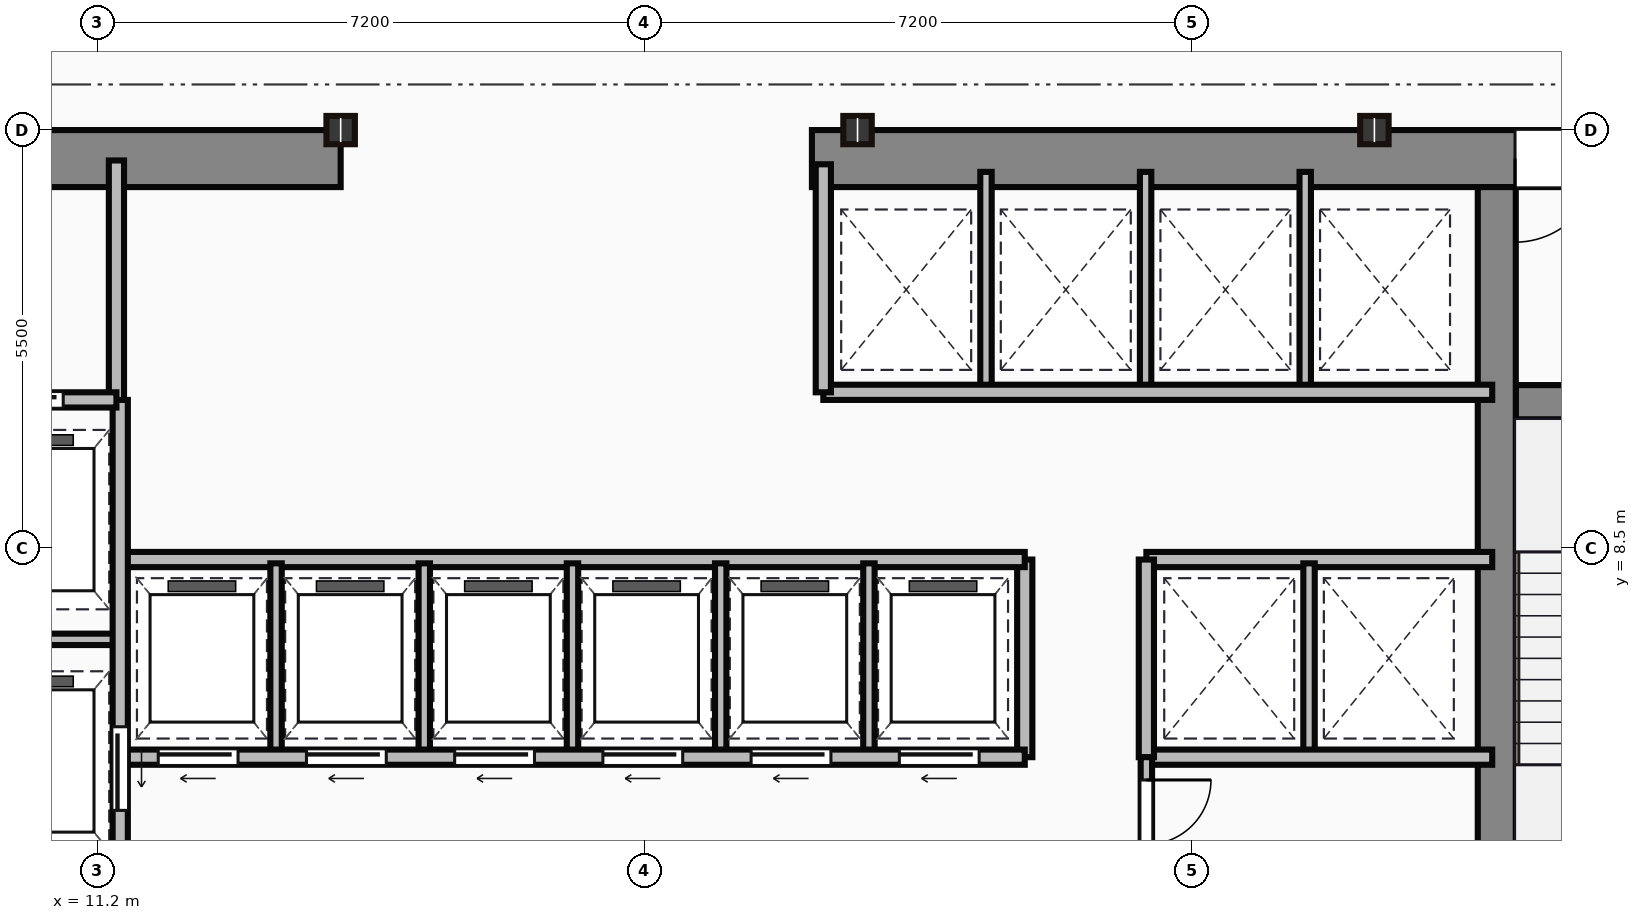
"""IFC4 building model, lengths in metres.
Left out: names, types, materials, properties, quantities, classifications, styles, units other than length and angle.
Written with IfcOpenShell. Run it as: python <this file> out.ifc"""

import sys

from ifc_helpers import new_model, si_unit, direction, frame, frame_2d, origin, origin_2d, place, context, subcontext, project, spatial, rectangle, i_section, extrude, source, transform, mapped, element, fill, save


model = new_model("IFC4")
c1 = context("Model", 3, precision=1e-05, world=origin(), true_north=direction((0.0, 1.0)))
c2 = subcontext(c1, "Body", "Model", "MODEL_VIEW")
j1 = project(units=[si_unit("LENGTHUNIT", "METRE"), si_unit("PLANEANGLEUNIT", "RADIAN")], contexts=[c1])
p1 = place(None, origin())
s1 = spatial("IfcSite", under=j1, at=p1, CompositionType="ELEMENT")
p2 = place(p1, origin())
s2 = spatial("IfcBuilding", under=s1, at=p2, CompositionType="ELEMENT")
p3 = place(p2, frame((0.0, 0.0, 155.2)))
s3 = spatial("IfcBuildingStorey", under=s2, at=p3, CompositionType="ELEMENT", Elevation=155.2)
m1 = source(origin(), c2, "Body", "SweptSolid", [
    extrude(rectangle(XDim=9.1, YDim=0.75, at=frame_2d((4.55, 0.0))), origin(), (0.0, 0.0, 1.0), 3.65),
])
p4 = place(p3, frame((5.3, 13.625, 0.0), z_axis=(0.0, 0.0, 1.0), x_axis=(1.0, 0.0, 0.0)))
e1 = element("IfcWall", 1, at=p4, inside=s3, PredefinedType="SHEAR", context=c2, shape_type="MappedRepresentation", body=[
    mapped(m1, transform((0.0, 0.0, 0.0))),
])
p5 = place(p4, frame((4.1, 0.0, 0.0)))
e2 = element("IfcOpeningElement", 2, at=p5, cuts=e1, PredefinedType="OPENING", context=c2, shape_type="SweptSolid", body=[
    extrude(rectangle(XDim=1.1, YDim=2.15, at=frame_2d((0.55, 1.075))), frame((0.0, 0.385, 0.0), z_axis=(0.0, -1.0, 0.0), x_axis=(1.0, 0.0, 0.0)), (0.0, 0.0, 1.0), 0.77),
])
m2 = source(origin(), c2, "Body", "SweptSolid", [
    extrude(rectangle(XDim=12.6, YDim=0.75, at=frame_2d((6.3, 0.0))), origin(), (0.0, 0.0, 1.0), 3.65),
])
p6 = place(p3, frame((20.6, 13.625, 0.0), z_axis=(0.0, 0.0, 1.0), x_axis=(1.0, 0.0, 0.0)))
e3 = element("IfcWall", 3, at=p6, inside=s3, PredefinedType="SHEAR", context=c2, shape_type="MappedRepresentation", body=[
    mapped(m2, transform((0.0, 0.0, 0.0))),
])
p7 = place(p6, frame((9.25, 0.0, 0.0)))
e4 = element("IfcOpeningElement", 4, at=p7, cuts=e3, PredefinedType="OPENING", context=c2, shape_type="SweptSolid", body=[
    extrude(rectangle(XDim=1.1, YDim=2.15, at=frame_2d((0.55, 1.075))), frame((0.0, 0.385, 0.0), z_axis=(0.0, -1.0, 0.0), x_axis=(1.0, 0.0, 0.0)), (0.0, 0.0, 1.0), 0.77),
])
m3 = source(origin(), c2, "Body", "SweptSolid", [
    extrude(rectangle(XDim=12.35, YDim=0.5, at=frame_2d((6.175, 0.0))), origin(), (0.0, 0.0, 1.0), 3.65),
])
p8 = place(p3, frame((29.61, 0.9, 0.0), z_axis=(0.0, 0.0, 1.0), x_axis=(0.0, 1.0, 0.0)))
e5 = element("IfcWall", 5, at=p8, inside=s3, PredefinedType="SHEAR", context=c2, shape_type="MappedRepresentation", body=[
    mapped(m3, transform((0.0, 0.0, 0.0))),
])
m4 = source(origin(), c2, "Body", "SweptSolid", [
    extrude(rectangle(XDim=3.39, YDim=0.45, at=frame_2d((1.695, 0.0))), origin(), (0.0, 0.0, 1.0), 3.65),
])
p9 = place(p3, frame((29.86, 10.42, 0.0), z_axis=(0.0, 0.0, 1.0), x_axis=(1.0, 0.0, 0.0)))
e6 = element("IfcWall", 6, at=p9, inside=s3, PredefinedType="SHEAR", context=c2, shape_type="MappedRepresentation", body=[
    mapped(m4, transform((0.0, 0.0, 0.0))),
])
p10 = place(p9, frame((1.1, 0.0, 0.0)))
e7 = element("IfcOpeningElement", 7, at=p10, cuts=e6, PredefinedType="OPENING", context=c2, shape_type="SweptSolid", body=[
    extrude(rectangle(XDim=1.1, YDim=2.15, at=frame_2d((0.55, 1.075))), frame((0.0, 0.235, 0.0), z_axis=(0.0, -1.0, 0.0), x_axis=(1.0, 0.0, 0.0)), (0.0, 0.0, 1.0), 0.47),
])
m5 = source(origin(), c2, "Body", "SweptSolid", [
    extrude(i_section(OverallWidth=0.374, OverallDepth=0.372, WebThickness=0.016, FlangeThickness=0.026, at=origin_2d()), origin(), (0.0, 0.0, 1.0), 3.65),
])
for number, where, z_axis, x_axis in (
    (8, (14.4, 14.0, 0.0), (0.0, 0.0, 1.0), (1.0, 0.0, 0.0)),
    (9, (21.2, 14.0, 0.0), (0.0, 0.0, 1.0), (1.0, 0.0, 0.0)),
    (10, (28.0, 14.0, 0.0), (0.0, 0.0, 1.0), (1.0, 0.0, 0.0)),
):
    element("IfcColumn", number, at=place(p3, frame(where, z_axis=z_axis, x_axis=x_axis)), inside=s3, PredefinedType="COLUMN", context=c2, shape_type="MappedRepresentation", body=[
        mapped(m5, transform((0.0, 0.0, 0.0))),
    ])
m6 = source(origin(), c2, "Body", "SweptSolid", [
    extrude(rectangle(XDim=3.18, YDim=0.2, at=frame_2d((1.59, 0.0))), origin(), (0.0, 0.0, 1.0), 3.4),
])
p11 = place(p3, frame((11.45, 10.42, 0.0), z_axis=(0.0, 0.0, 1.0), x_axis=(0.0, 1.0, 0.0)))
e11 = element("IfcWall", 11, at=p11, inside=s3, PredefinedType="PARTITIONING", context=c2, shape_type="MappedRepresentation", body=[
    mapped(m6, transform((0.0, 0.0, 0.0))),
])
m7 = source(origin(), c2, "Body", "SweptSolid", [
    extrude(rectangle(XDim=2.35, YDim=0.2, at=frame_2d((1.175, 0.0))), origin(), (0.0, 0.0, 1.0), 3.4),
])
p12 = place(p3, frame((9.1, 10.45, 0.0), z_axis=(0.0, 0.0, 1.0), x_axis=(1.0, 0.0, 0.0)))
e12 = element("IfcWall", 12, at=p12, inside=s3, PredefinedType="PARTITIONING", context=c2, shape_type="MappedRepresentation", body=[
    mapped(m7, transform((0.0, 0.0, 0.0))),
])
p13 = place(p12, frame((0.55, 0.0, 0.0)))
e13 = element("IfcOpeningElement", 13, at=p13, cuts=e12, PredefinedType="OPENING", context=c2, shape_type="SweptSolid", body=[
    extrude(rectangle(XDim=1.1, YDim=2.15, at=frame_2d((0.55, 1.075))), frame((0.0, 0.11, 0.0), z_axis=(0.0, -1.0, 0.0), x_axis=(1.0, 0.0, 0.0)), (0.0, 0.0, 1.0), 0.22),
])
m8 = source(origin(), c2, "Body", "SweptSolid", [
    extrude(rectangle(XDim=9.6, YDim=0.2, at=frame_2d((4.8, 0.0))), origin(), (0.0, 0.0, 1.0), 3.4),
])
p14 = place(p3, frame((11.5, 0.85, 0.0), z_axis=(0.0, 0.0, 1.0), x_axis=(0.0, 1.0, 0.0)))
e14 = element("IfcWall", 14, at=p14, inside=s3, PredefinedType="PARTITIONING", context=c2, shape_type="MappedRepresentation", body=[
    mapped(m8, transform((0.0, 0.0, 0.0))),
])
p15 = place(p14, frame((4.2, 0.0, 0.0)))
e15 = element("IfcOpeningElement", 15, at=p15, cuts=e14, PredefinedType="OPENING", context=c2, shape_type="SweptSolid", body=[
    extrude(rectangle(XDim=1.1, YDim=2.15, at=frame_2d((0.55, 1.075))), frame((0.0, 0.11, 0.0), z_axis=(0.0, -1.0, 0.0), x_axis=(1.0, 0.0, 0.0)), (0.0, 0.0, 1.0), 0.22),
])
p16 = place(p14, frame((0.9, 0.0, 0.0)))
e16 = element("IfcOpeningElement", 16, at=p16, cuts=e14, PredefinedType="OPENING", context=c2, shape_type="SweptSolid", body=[
    extrude(rectangle(XDim=1.2, YDim=2.15, at=frame_2d((0.6, 1.075))), frame((0.0, 0.11, 0.0), z_axis=(0.0, -1.0, 0.0), x_axis=(1.0, 0.0, 0.0)), (0.0, 0.0, 1.0), 0.22),
])
m9 = source(origin(), c2, "Body", "SweptSolid", [
    extrude(rectangle(XDim=2.4, YDim=0.15, at=frame_2d((1.2, 0.0))), origin(), (0.0, 0.0, 1.0), 3.4),
])
p17 = place(p3, frame((9.1, 7.3, 0.0), z_axis=(0.0, 0.0, 1.0), x_axis=(1.0, 0.0, 0.0)))
e17 = element("IfcWall", 17, at=p17, inside=s3, PredefinedType="PARTITIONING", context=c2, shape_type="MappedRepresentation", body=[
    mapped(m9, transform((0.0, 0.0, 0.0))),
])
m10 = source(origin(), c2, "Body", "SweptSolid", [
    extrude(rectangle(XDim=11.85, YDim=0.2, at=frame_2d((5.925, 0.0))), origin(), (0.0, 0.0, 1.0), 3.4),
])
p18 = place(p3, frame((11.55, 5.75, 0.0), z_axis=(0.0, 0.0, 1.0), x_axis=(1.0, 0.0, 0.0)))
e18 = element("IfcWall", 18, at=p18, inside=s3, PredefinedType="PARTITIONING", context=c2, shape_type="MappedRepresentation", body=[
    mapped(m10, transform((0.0, 0.0, 0.0))),
])
p19 = place(p18, frame((0.45, 0.0, 0.0)))
e19 = element("IfcOpeningElement", 19, at=p19, cuts=e18, PredefinedType="OPENING", context=c2, shape_type="SweptSolid", body=[
    extrude(rectangle(XDim=1.05, YDim=2.15, at=frame_2d((0.525, 1.075))), frame((0.0, 0.11, 0.0), z_axis=(0.0, -1.0, 0.0), x_axis=(1.0, 0.0, 0.0)), (0.0, 0.0, 1.0), 0.22),
])
p20 = place(p18, frame((2.4, 0.0, 0.0)))
e20 = element("IfcOpeningElement", 20, at=p20, cuts=e18, PredefinedType="OPENING", context=c2, shape_type="SweptSolid", body=[
    extrude(rectangle(XDim=1.05, YDim=2.15, at=frame_2d((0.525, 1.075))), frame((0.0, 0.11, 0.0), z_axis=(0.0, -1.0, 0.0), x_axis=(1.0, 0.0, 0.0)), (0.0, 0.0, 1.0), 0.22),
])
p21 = place(p18, frame((4.35, 0.0, 0.0)))
e21 = element("IfcOpeningElement", 21, at=p21, cuts=e18, PredefinedType="OPENING", context=c2, shape_type="SweptSolid", body=[
    extrude(rectangle(XDim=1.05, YDim=2.15, at=frame_2d((0.525, 1.075))), frame((0.0, 0.11, 0.0), z_axis=(0.0, -1.0, 0.0), x_axis=(1.0, 0.0, 0.0)), (0.0, 0.0, 1.0), 0.22),
])
p22 = place(p18, frame((6.3, 0.0, 0.0)))
e22 = element("IfcOpeningElement", 22, at=p22, cuts=e18, PredefinedType="OPENING", context=c2, shape_type="SweptSolid", body=[
    extrude(rectangle(XDim=1.05, YDim=2.15, at=frame_2d((0.525, 1.075))), frame((0.0, 0.11, 0.0), z_axis=(0.0, -1.0, 0.0), x_axis=(1.0, 0.0, 0.0)), (0.0, 0.0, 1.0), 0.22),
])
p23 = place(p18, frame((8.25, 0.0, 0.0)))
e23 = element("IfcOpeningElement", 23, at=p23, cuts=e18, PredefinedType="OPENING", context=c2, shape_type="SweptSolid", body=[
    extrude(rectangle(XDim=1.05, YDim=2.15, at=frame_2d((0.525, 1.075))), frame((0.0, 0.11, 0.0), z_axis=(0.0, -1.0, 0.0), x_axis=(1.0, 0.0, 0.0)), (0.0, 0.0, 1.0), 0.22),
])
p24 = place(p18, frame((10.2, 0.0, 0.0)))
e24 = element("IfcOpeningElement", 24, at=p24, cuts=e18, PredefinedType="OPENING", context=c2, shape_type="SweptSolid", body=[
    extrude(rectangle(XDim=1.05, YDim=2.15, at=frame_2d((0.525, 1.075))), frame((0.0, 0.11, 0.0), z_axis=(0.0, -1.0, 0.0), x_axis=(1.0, 0.0, 0.0)), (0.0, 0.0, 1.0), 0.22),
])
p25 = place(p3, frame((11.55, 8.35, 0.0), z_axis=(0.0, 0.0, 1.0), x_axis=(1.0, 0.0, 0.0)))
e25 = element("IfcWall", 25, at=p25, inside=s3, PredefinedType="PARTITIONING", context=c2, shape_type="MappedRepresentation", body=[
    mapped(m10, transform((0.0, 0.0, 0.0))),
])
m11 = source(origin(), c2, "Body", "SweptSolid", [
    extrude(rectangle(XDim=2.6, YDim=0.2, at=frame_2d((1.3, 0.0))), origin(), (0.0, 0.0, 1.0), 3.4),
])
p26 = place(p3, frame((23.4, 5.75, 0.0), z_axis=(0.0, 0.0, 1.0), x_axis=(0.0, 1.0, 0.0)))
e26 = element("IfcWall", 26, at=p26, inside=s3, PredefinedType="PARTITIONING", context=c2, shape_type="MappedRepresentation", body=[
    mapped(m11, transform((0.0, 0.0, 0.0))),
])
m12 = source(origin(), c2, "Body", "SweptSolid", [
    extrude(rectangle(XDim=2.5, YDim=0.15, at=frame_2d((1.25, 0.0))), origin(), (0.0, 0.0, 1.0), 3.4),
])
for number, where, z_axis, x_axis in (
    (27, (13.55, 5.8, 0.0), (0.0, 0.0, 1.0), (0.0, 1.0, 0.0)),
    (28, (15.5, 5.8, 0.0), (0.0, 0.0, 1.0), (0.0, 1.0, 0.0)),
    (29, (17.45, 5.8, 0.0), (0.0, 0.0, 1.0), (0.0, 1.0, 0.0)),
    (30, (19.4, 5.8, 0.0), (0.0, 0.0, 1.0), (0.0, 1.0, 0.0)),
    (31, (21.35, 5.8, 0.0), (0.0, 0.0, 1.0), (0.0, 1.0, 0.0)),
):
    element("IfcWall", number, at=place(p3, frame(where, z_axis=z_axis, x_axis=x_axis)), inside=s3, PredefinedType="PARTITIONING", context=c2, shape_type="MappedRepresentation", body=[
        mapped(m12, transform((0.0, 0.0, 0.0))),
    ])
m13 = source(origin(), c2, "Body", "SweptSolid", [
    extrude(rectangle(XDim=8.8, YDim=0.2, at=frame_2d((4.4, 0.0))), origin(), (0.0, 0.0, 1.0), 3.4),
])
p27 = place(p3, frame((20.75, 10.55, 0.0), z_axis=(0.0, 0.0, 1.0), x_axis=(1.0, 0.0, 0.0)))
e32 = element("IfcWall", 32, at=p27, inside=s3, PredefinedType="PARTITIONING", context=c2, shape_type="MappedRepresentation", body=[
    mapped(m13, transform((0.0, 0.0, 0.0))),
])
m14 = source(origin(), c2, "Body", "SweptSolid", [
    extrude(rectangle(XDim=3.0, YDim=0.2, at=frame_2d((1.5, 0.0))), origin(), (0.0, 0.0, 1.0), 3.4),
])
p28 = place(p3, frame((20.75, 10.55, 0.0), z_axis=(0.0, 0.0, 1.0), x_axis=(0.0, 1.0, 0.0)))
e33 = element("IfcWall", 33, at=p28, inside=s3, PredefinedType="PARTITIONING", context=c2, shape_type="MappedRepresentation", body=[
    mapped(m14, transform((0.0, 0.0, 0.0))),
])
m15 = source(origin(), c2, "Body", "SweptSolid", [
    extrude(rectangle(XDim=2.85, YDim=0.15, at=frame_2d((1.425, 0.0))), origin(), (0.0, 0.0, 1.0), 3.4),
])
for number, where, z_axis, x_axis in (
    (34, (22.89, 10.6, 0.0), (0.0, 0.0, 1.0), (0.0, 1.0, 0.0)),
    (35, (24.99, 10.6, 0.0), (0.0, 0.0, 1.0), (0.0, 1.0, 0.0)),
    (36, (27.09, 10.6, 0.0), (0.0, 0.0, 1.0), (0.0, 1.0, 0.0)),
):
    element("IfcWall", number, at=place(p3, frame(where, z_axis=z_axis, x_axis=x_axis)), inside=s3, PredefinedType="PARTITIONING", context=c2, shape_type="MappedRepresentation", body=[
        mapped(m15, transform((0.0, 0.0, 0.0))),
    ])
m16 = source(origin(), c2, "Body", "SweptSolid", [
    extrude(rectangle(XDim=4.55, YDim=0.2, at=frame_2d((2.275, 0.0))), origin(), (0.0, 0.0, 1.0), 3.4),
])
for number, where, z_axis, x_axis in (
    (37, (25.0, 8.35, 0.0), (0.0, 0.0, 1.0), (1.0, 0.0, 0.0)),
    (38, (25.0, 5.75, 0.0), (0.0, 0.0, 1.0), (1.0, 0.0, 0.0)),
):
    element("IfcWall", number, at=place(p3, frame(where, z_axis=z_axis, x_axis=x_axis)), inside=s3, PredefinedType="PARTITIONING", context=c2, shape_type="MappedRepresentation", body=[
        mapped(m16, transform((0.0, 0.0, 0.0))),
    ])
p29 = place(p3, frame((25.0, 5.75, 0.0), z_axis=(0.0, 0.0, 1.0), x_axis=(0.0, 1.0, 0.0)))
e39 = element("IfcWall", 39, at=p29, inside=s3, PredefinedType="PARTITIONING", context=c2, shape_type="MappedRepresentation", body=[
    mapped(m11, transform((0.0, 0.0, 0.0))),
])
p30 = place(p3, frame((27.14, 5.8, 0.0), z_axis=(0.0, 0.0, 1.0), x_axis=(0.0, 1.0, 0.0)))
e40 = element("IfcWall", 40, at=p30, inside=s3, PredefinedType="PARTITIONING", context=c2, shape_type="MappedRepresentation", body=[
    mapped(m12, transform((0.0, 0.0, 0.0))),
])
m17 = source(origin(), c2, "Body", "SweptSolid", [
    extrude(rectangle(XDim=4.9, YDim=0.15, at=frame_2d((2.45, 0.0))), origin(), (0.0, 0.0, 1.0), 3.4),
])
p31 = place(p3, frame((25.0, 0.85, 0.0), z_axis=(0.0, 0.0, 1.0), x_axis=(0.0, 1.0, 0.0)))
e41 = element("IfcWall", 41, at=p31, inside=s3, PredefinedType="PARTITIONING", context=c2, shape_type="MappedRepresentation", body=[
    mapped(m17, transform((0.0, 0.0, 0.0))),
])
p32 = place(p31, frame((2.0, 0.0, 0.0)))
e42 = element("IfcOpeningElement", 42, at=p32, cuts=e41, PredefinedType="OPENING", context=c2, shape_type="SweptSolid", body=[
    extrude(rectangle(XDim=0.95, YDim=2.15, at=frame_2d((0.475, 1.075))), frame((0.0, 0.085, 0.0), z_axis=(0.0, -1.0, 0.0), x_axis=(1.0, 0.0, 0.0)), (0.0, 0.0, 1.0), 0.17),
])
p33 = place(p31, frame((3.75, 0.0, 0.0)))
e43 = element("IfcOpeningElement", 43, at=p33, cuts=e41, PredefinedType="OPENING", context=c2, shape_type="SweptSolid", body=[
    extrude(rectangle(XDim=0.85, YDim=2.15, at=frame_2d((0.425, 1.075))), frame((0.0, 0.085, 0.0), z_axis=(0.0, -1.0, 0.0), x_axis=(1.0, 0.0, 0.0)), (0.0, 0.0, 1.0), 0.17),
])
m18 = source(origin(), c2, "Body", "SweptSolid", [
    extrude(rectangle(XDim=1.1, YDim=2.15, at=frame_2d((0.55, 1.075))), frame((0.0, 0.025, 0.0), z_axis=(0.0, -1.0, 0.0), x_axis=(1.0, 0.0, 0.0)), (0.0, 0.0, 1.0), 0.05),
])
p34 = place(p7, origin())
e44 = element("IfcDoor", 44, at=p34, inside=s3, OperationType="SINGLE_SWING_LEFT", PredefinedType="DOOR", context=c2, shape_type="MappedRepresentation", body=[
    mapped(m18, transform((0.0, 0.0, 0.0))),
])
fill(e4, e44)
p35 = place(p13, origin())
e45 = element("IfcDoor", 45, at=p35, inside=s3, OperationType="SLIDING_TO_LEFT", PredefinedType="DOOR", context=c2, shape_type="MappedRepresentation", body=[
    mapped(m18, transform((0.0, 0.0, 0.0))),
])
fill(e13, e45)
p36 = place(p15, frame((1.1, 0.0, 0.0), z_axis=(0.0, 0.0, 1.0), x_axis=(-1.0, 0.0, 0.0)))
e46 = element("IfcDoor", 46, at=p36, inside=s3, OperationType="SLIDING_TO_LEFT", PredefinedType="DOOR", context=c2, shape_type="MappedRepresentation", body=[
    mapped(m18, transform((0.0, 0.0, 0.0))),
])
fill(e15, e46)
m19 = source(origin(), c2, "Body", "SweptSolid", [
    extrude(rectangle(XDim=1.05, YDim=2.15, at=frame_2d((0.525, 1.075))), frame((0.0, 0.025, 0.0), z_axis=(0.0, -1.0, 0.0), x_axis=(1.0, 0.0, 0.0)), (0.0, 0.0, 1.0), 0.05),
])
p37 = place(p19, frame((1.05, 0.0, 0.0), z_axis=(0.0, 0.0, 1.0), x_axis=(-1.0, 0.0, 0.0)))
e47 = element("IfcDoor", 47, at=p37, inside=s3, OperationType="SLIDING_TO_LEFT", PredefinedType="DOOR", context=c2, shape_type="MappedRepresentation", body=[
    mapped(m19, transform((0.0, 0.0, 0.0))),
])
fill(e19, e47)
p38 = place(p20, frame((1.05, 0.0, 0.0), z_axis=(0.0, 0.0, 1.0), x_axis=(-1.0, 0.0, 0.0)))
e48 = element("IfcDoor", 48, at=p38, inside=s3, OperationType="SLIDING_TO_LEFT", PredefinedType="DOOR", context=c2, shape_type="MappedRepresentation", body=[
    mapped(m19, transform((0.0, 0.0, 0.0))),
])
fill(e20, e48)
p39 = place(p21, frame((1.05, 0.0, 0.0), z_axis=(0.0, 0.0, 1.0), x_axis=(-1.0, 0.0, 0.0)))
e49 = element("IfcDoor", 49, at=p39, inside=s3, OperationType="SLIDING_TO_LEFT", PredefinedType="DOOR", context=c2, shape_type="MappedRepresentation", body=[
    mapped(m19, transform((0.0, 0.0, 0.0))),
])
fill(e21, e49)
p40 = place(p22, frame((1.05, 0.0, 0.0), z_axis=(0.0, 0.0, 1.0), x_axis=(-1.0, 0.0, 0.0)))
e50 = element("IfcDoor", 50, at=p40, inside=s3, OperationType="SLIDING_TO_LEFT", PredefinedType="DOOR", context=c2, shape_type="MappedRepresentation", body=[
    mapped(m19, transform((0.0, 0.0, 0.0))),
])
fill(e22, e50)
p41 = place(p23, frame((1.05, 0.0, 0.0), z_axis=(0.0, 0.0, 1.0), x_axis=(-1.0, 0.0, 0.0)))
e51 = element("IfcDoor", 51, at=p41, inside=s3, OperationType="SLIDING_TO_LEFT", PredefinedType="DOOR", context=c2, shape_type="MappedRepresentation", body=[
    mapped(m19, transform((0.0, 0.0, 0.0))),
])
fill(e23, e51)
p42 = place(p24, frame((1.05, 0.0, 0.0), z_axis=(0.0, 0.0, 1.0), x_axis=(-1.0, 0.0, 0.0)))
e52 = element("IfcDoor", 52, at=p42, inside=s3, OperationType="SLIDING_TO_LEFT", PredefinedType="DOOR", context=c2, shape_type="MappedRepresentation", body=[
    mapped(m19, transform((0.0, 0.0, 0.0))),
])
fill(e24, e52)
m20 = source(origin(), c2, "Body", "SweptSolid", [
    extrude(rectangle(XDim=0.85, YDim=2.15, at=frame_2d((0.425, 1.075))), frame((0.0, 0.025, 0.0), z_axis=(0.0, -1.0, 0.0), x_axis=(1.0, 0.0, 0.0)), (0.0, 0.0, 1.0), 0.05),
])
p43 = place(p33, origin())
e53 = element("IfcDoor", 53, at=p43, inside=s3, OperationType="SINGLE_SWING_RIGHT", PredefinedType="DOOR", context=c2, shape_type="MappedRepresentation", body=[
    mapped(m20, transform((0.0, 0.0, 0.0))),
])
fill(e43, e53)
save(model, sys.argv[1])
